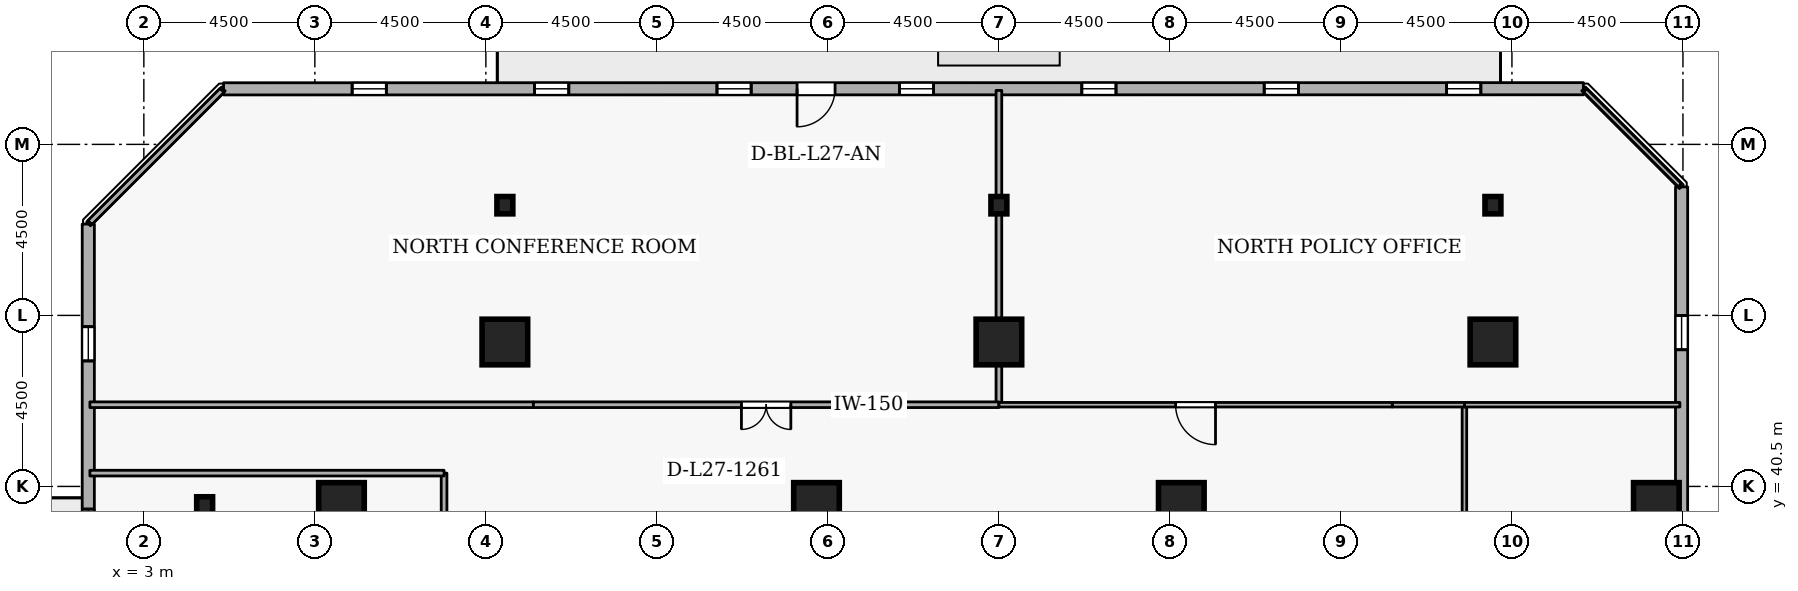
"""IFC4 building model, lengths in metres.
Left out: names, types, materials, properties, quantities, classifications, styles, units other than length and angle.
Written with IfcOpenShell. Run it as: python <this file> out.ifc"""

import sys

from ifc_helpers import new_model, si_unit, direction, frame, frame_2d, origin, origin_2d, place, context, subcontext, project, spatial, rectangle, i_section, extrude, element, fill, save


model = new_model("IFC4")
c1 = context("Model", 3, precision=1e-05, world=origin(), true_north=direction((0.0, 1.0)))
c2 = subcontext(c1, "Body", "Model", "MODEL_VIEW")
j1 = project(units=[si_unit("LENGTHUNIT", "METRE"), si_unit("PLANEANGLEUNIT", "RADIAN")], contexts=[c1])
p1 = place(None, origin())
s1 = spatial("IfcSite", under=j1, at=p1, CompositionType="ELEMENT")
p2 = place(p1, origin())
s2 = spatial("IfcBuilding", under=s1, at=p2, CompositionType="ELEMENT")
p3 = place(p2, frame((0.0, 0.0, 105.3)))
s3 = spatial("IfcBuildingStorey", under=s2, at=p3, CompositionType="ELEMENT", Elevation=105.3)
for number, where, z_axis, x_axis in (
    (1, (42.8, 40.0, 0.0), (0.0, 0.0, 1.0), (1.0, 0.0, 0.0)),
    (2, (12.5, 44.3, 0.0), (0.0, 0.0, 1.0), (1.0, 0.0, 0.0)),
    (3, (25.5, 44.3, 0.0), (0.0, 0.0, 1.0), (1.0, 0.0, 0.0)),
    (4, (38.5, 44.3, 0.0), (0.0, 0.0, 1.0), (1.0, 0.0, 0.0)),
    (5, (8.2, 40.0, 0.0), (0.0, 0.0, 1.0), (1.0, 0.0, 0.0)),
    (6, (20.7, 40.0, 0.0), (0.0, 0.0, 1.0), (1.0, 0.0, 0.0)),
    (7, (30.3, 40.0, 0.0), (0.0, 0.0, 1.0), (1.0, 0.0, 0.0)),
):
    element("IfcColumn", number, at=place(p3, frame(where, z_axis=z_axis, x_axis=x_axis)), inside=s3, PredefinedType="COLUMN", context=c2, shape_type="SweptSolid", body=[
        extrude(rectangle(XDim=1.2, YDim=1.2, at=origin_2d()), origin(), (0.0, 0.0, 1.0), 3.6),
    ])
for number, where, z_axis, x_axis in (
    (8, (12.5, 47.9, 0.0), (0.0, 0.0, 1.0), (1.0, 0.0, 0.0)),
    (9, (25.5, 47.9, 0.0), (0.0, 0.0, 1.0), (1.0, 0.0, 0.0)),
    (10, (38.5, 47.9, 0.0), (0.0, 0.0, 1.0), (1.0, 0.0, 0.0)),
    (11, (4.6, 40.0, 0.0), (0.0, 0.0, 1.0), (1.0, 0.0, 0.0)),
):
    element("IfcColumn", number, at=place(p3, frame(where, z_axis=z_axis, x_axis=x_axis)), inside=s3, PredefinedType="COLUMN", context=c2, shape_type="SweptSolid", body=[
        extrude(i_section(OverallWidth=0.418, OverallDepth=0.456, WebThickness=0.042, FlangeThickness=0.067, FilletRadius=0.015, at=origin_2d()), origin(), (0.0, 0.0, 1.0), 3.6),
    ])
p4 = place(p3, frame((43.461, 12.597, 0.0), z_axis=(0.0, 0.0, 1.0), x_axis=(8.8693006e-05, 0.999999996067, 0.0)))
e12 = element("IfcWall", 12, at=p4, inside=s3, PredefinedType="STANDARD", context=c2, shape_type="SweptSolid", body=[
    extrude(rectangle(XDim=35.784, YDim=0.32, at=frame_2d((17.892, 0.0))), origin(), (0.0, 0.0, 1.0), 2.7),
])
p5 = place(p4, frame((2.7, 0.0, 0.72)))
e13 = element("IfcOpeningElement", 13, at=p5, cuts=e12, PredefinedType="OPENING", context=c2, shape_type="SweptSolid", body=[
    extrude(rectangle(XDim=0.9, YDim=1.75, at=frame_2d((0.45, 0.875))), frame((0.0, 0.17, 0.0), z_axis=(0.0, -1.0, 0.0), x_axis=(1.0, 0.0, 0.0)), (0.0, 0.0, 1.0), 0.34),
])
p6 = place(p4, frame((7.5, 0.0, 0.72)))
e14 = element("IfcOpeningElement", 14, at=p6, cuts=e12, PredefinedType="OPENING", context=c2, shape_type="SweptSolid", body=[
    extrude(rectangle(XDim=0.9, YDim=1.75, at=frame_2d((0.45, 0.875))), frame((0.0, 0.17, 0.0), z_axis=(0.0, -1.0, 0.0), x_axis=(1.0, 0.0, 0.0)), (0.0, 0.0, 1.0), 0.34),
])
p7 = place(p4, frame((12.3, 0.0, 0.72)))
e15 = element("IfcOpeningElement", 15, at=p7, cuts=e12, PredefinedType="OPENING", context=c2, shape_type="SweptSolid", body=[
    extrude(rectangle(XDim=0.9, YDim=1.75, at=frame_2d((0.45, 0.875))), frame((0.0, 0.17, 0.0), z_axis=(0.0, -1.0, 0.0), x_axis=(1.0, 0.0, 0.0)), (0.0, 0.0, 1.0), 0.34),
])
p8 = place(p4, frame((17.1, 0.0, 0.72)))
e16 = element("IfcOpeningElement", 16, at=p8, cuts=e12, PredefinedType="OPENING", context=c2, shape_type="SweptSolid", body=[
    extrude(rectangle(XDim=0.9, YDim=1.75, at=frame_2d((0.45, 0.875))), frame((0.0, 0.17, 0.0), z_axis=(0.0, -1.0, 0.0), x_axis=(1.0, 0.0, 0.0)), (0.0, 0.0, 1.0), 0.34),
])
p9 = place(p4, frame((21.9, 0.0, 0.72)))
e17 = element("IfcOpeningElement", 17, at=p9, cuts=e12, PredefinedType="OPENING", context=c2, shape_type="SweptSolid", body=[
    extrude(rectangle(XDim=0.9, YDim=1.75, at=frame_2d((0.45, 0.875))), frame((0.0, 0.17, 0.0), z_axis=(0.0, -1.0, 0.0), x_axis=(1.0, 0.0, 0.0)), (0.0, 0.0, 1.0), 0.34),
])
p10 = place(p4, frame((31.5, 0.0, 0.72)))
e18 = element("IfcOpeningElement", 18, at=p10, cuts=e12, PredefinedType="OPENING", context=c2, shape_type="SweptSolid", body=[
    extrude(rectangle(XDim=0.9, YDim=1.75, at=frame_2d((0.45, 0.875))), frame((0.0, 0.17, 0.0), z_axis=(0.0, -1.0, 0.0), x_axis=(1.0, 0.0, 0.0)), (0.0, 0.0, 1.0), 0.34),
])
p11 = place(p3, frame((40.881, 50.965, 0.0), z_axis=(0.0, 0.0, 1.0), x_axis=(-0.999999996067, -8.8693006e-05, 0.0)))
e19 = element("IfcWall", 19, at=p11, inside=s3, PredefinedType="STANDARD", context=c2, shape_type="SweptSolid", body=[
    extrude(rectangle(XDim=35.784, YDim=0.32, at=frame_2d((17.892, 0.0))), origin(), (0.0, 0.0, 1.0), 2.7),
])
p12 = place(p11, frame((19.692, 0.0, 0.0)))
e20 = element("IfcOpeningElement", 20, at=p12, cuts=e19, PredefinedType="OPENING", context=c2, shape_type="SweptSolid", body=[
    extrude(rectangle(XDim=1.0, YDim=2.08, at=frame_2d((0.5, 1.04))), frame((0.0, 0.17, 0.0), z_axis=(0.0, -1.0, 0.0), x_axis=(1.0, 0.0, 0.0)), (0.0, 0.0, 1.0), 0.34),
])
p13 = place(p11, frame((2.7, 0.0, 0.72)))
e21 = element("IfcOpeningElement", 21, at=p13, cuts=e19, PredefinedType="OPENING", context=c2, shape_type="SweptSolid", body=[
    extrude(rectangle(XDim=0.9, YDim=1.75, at=frame_2d((0.45, 0.875))), frame((0.0, 0.17, 0.0), z_axis=(0.0, -1.0, 0.0), x_axis=(1.0, 0.0, 0.0)), (0.0, 0.0, 1.0), 0.34),
])
p14 = place(p11, frame((7.5, 0.0, 0.72)))
e22 = element("IfcOpeningElement", 22, at=p14, cuts=e19, PredefinedType="OPENING", context=c2, shape_type="SweptSolid", body=[
    extrude(rectangle(XDim=0.9, YDim=1.75, at=frame_2d((0.45, 0.875))), frame((0.0, 0.17, 0.0), z_axis=(0.0, -1.0, 0.0), x_axis=(1.0, 0.0, 0.0)), (0.0, 0.0, 1.0), 0.34),
])
p15 = place(p11, frame((12.3, 0.0, 0.72)))
e23 = element("IfcOpeningElement", 23, at=p15, cuts=e19, PredefinedType="OPENING", context=c2, shape_type="SweptSolid", body=[
    extrude(rectangle(XDim=0.9, YDim=1.75, at=frame_2d((0.45, 0.875))), frame((0.0, 0.17, 0.0), z_axis=(0.0, -1.0, 0.0), x_axis=(1.0, 0.0, 0.0)), (0.0, 0.0, 1.0), 0.34),
])
p16 = place(p11, frame((17.1, 0.0, 0.72)))
e24 = element("IfcOpeningElement", 24, at=p16, cuts=e19, PredefinedType="OPENING", context=c2, shape_type="SweptSolid", body=[
    extrude(rectangle(XDim=0.9, YDim=1.75, at=frame_2d((0.45, 0.875))), frame((0.0, 0.17, 0.0), z_axis=(0.0, -1.0, 0.0), x_axis=(1.0, 0.0, 0.0)), (0.0, 0.0, 1.0), 0.34),
])
p17 = place(p11, frame((21.9, 0.0, 0.72)))
e25 = element("IfcOpeningElement", 25, at=p17, cuts=e19, PredefinedType="OPENING", context=c2, shape_type="SweptSolid", body=[
    extrude(rectangle(XDim=0.9, YDim=1.75, at=frame_2d((0.45, 0.875))), frame((0.0, 0.17, 0.0), z_axis=(0.0, -1.0, 0.0), x_axis=(1.0, 0.0, 0.0)), (0.0, 0.0, 1.0), 0.34),
])
p18 = place(p11, frame((26.7, 0.0, 0.72)))
e26 = element("IfcOpeningElement", 26, at=p18, cuts=e19, PredefinedType="OPENING", context=c2, shape_type="SweptSolid", body=[
    extrude(rectangle(XDim=0.9, YDim=1.75, at=frame_2d((0.45, 0.875))), frame((0.0, 0.17, 0.0), z_axis=(0.0, -1.0, 0.0), x_axis=(1.0, 0.0, 0.0)), (0.0, 0.0, 1.0), 0.34),
])
p19 = place(p11, frame((31.5, 0.0, 0.72)))
e27 = element("IfcOpeningElement", 27, at=p19, cuts=e19, PredefinedType="OPENING", context=c2, shape_type="SweptSolid", body=[
    extrude(rectangle(XDim=0.9, YDim=1.75, at=frame_2d((0.45, 0.875))), frame((0.0, 0.17, 0.0), z_axis=(0.0, -1.0, 0.0), x_axis=(1.0, 0.0, 0.0)), (0.0, 0.0, 1.0), 0.34),
])
p20 = place(p3, frame((1.539, 47.403, 0.0), z_axis=(0.0, 0.0, 1.0), x_axis=(-8.8693006e-05, -0.999999996067, 0.0)))
e28 = element("IfcWall", 28, at=p20, inside=s3, PredefinedType="STANDARD", context=c2, shape_type="SweptSolid", body=[
    extrude(rectangle(XDim=35.784, YDim=0.32, at=frame_2d((17.892, 0.0))), origin(), (0.0, 0.0, 1.0), 2.7),
])
p21 = place(p20, frame((18.792, 0.0, 0.0)))
e29 = element("IfcOpeningElement", 29, at=p21, cuts=e28, PredefinedType="OPENING", context=c2, shape_type="SweptSolid", body=[
    extrude(rectangle(XDim=1.0, YDim=2.08, at=frame_2d((0.5, 1.04))), frame((0.0, 0.17, 0.0), z_axis=(0.0, -1.0, 0.0), x_axis=(1.0, 0.0, 0.0)), (0.0, 0.0, 1.0), 0.34),
])
p22 = place(p20, frame((2.7, 0.0, 0.72)))
e30 = element("IfcOpeningElement", 30, at=p22, cuts=e28, PredefinedType="OPENING", context=c2, shape_type="SweptSolid", body=[
    extrude(rectangle(XDim=0.9, YDim=1.75, at=frame_2d((0.45, 0.875))), frame((0.0, 0.17, 0.0), z_axis=(0.0, -1.0, 0.0), x_axis=(1.0, 0.0, 0.0)), (0.0, 0.0, 1.0), 0.34),
])
p23 = place(p20, frame((7.5, 0.0, 0.72)))
e31 = element("IfcOpeningElement", 31, at=p23, cuts=e28, PredefinedType="OPENING", context=c2, shape_type="SweptSolid", body=[
    extrude(rectangle(XDim=0.9, YDim=1.75, at=frame_2d((0.45, 0.875))), frame((0.0, 0.17, 0.0), z_axis=(0.0, -1.0, 0.0), x_axis=(1.0, 0.0, 0.0)), (0.0, 0.0, 1.0), 0.34),
])
p24 = place(p20, frame((12.3, 0.0, 0.72)))
e32 = element("IfcOpeningElement", 32, at=p24, cuts=e28, PredefinedType="OPENING", context=c2, shape_type="SweptSolid", body=[
    extrude(rectangle(XDim=0.9, YDim=1.75, at=frame_2d((0.45, 0.875))), frame((0.0, 0.17, 0.0), z_axis=(0.0, -1.0, 0.0), x_axis=(1.0, 0.0, 0.0)), (0.0, 0.0, 1.0), 0.34),
])
p25 = place(p20, frame((17.1, 0.0, 0.72)))
e33 = element("IfcOpeningElement", 33, at=p25, cuts=e28, PredefinedType="OPENING", context=c2, shape_type="SweptSolid", body=[
    extrude(rectangle(XDim=0.9, YDim=1.75, at=frame_2d((0.45, 0.875))), frame((0.0, 0.17, 0.0), z_axis=(0.0, -1.0, 0.0), x_axis=(1.0, 0.0, 0.0)), (0.0, 0.0, 1.0), 0.34),
])
p26 = place(p20, frame((21.9, 0.0, 0.72)))
e34 = element("IfcOpeningElement", 34, at=p26, cuts=e28, PredefinedType="OPENING", context=c2, shape_type="SweptSolid", body=[
    extrude(rectangle(XDim=0.9, YDim=1.75, at=frame_2d((0.45, 0.875))), frame((0.0, 0.17, 0.0), z_axis=(0.0, -1.0, 0.0), x_axis=(1.0, 0.0, 0.0)), (0.0, 0.0, 1.0), 0.34),
])
p27 = place(p20, frame((26.7, 0.0, 0.72)))
e35 = element("IfcOpeningElement", 35, at=p27, cuts=e28, PredefinedType="OPENING", context=c2, shape_type="SweptSolid", body=[
    extrude(rectangle(XDim=0.9, YDim=1.75, at=frame_2d((0.45, 0.875))), frame((0.0, 0.17, 0.0), z_axis=(0.0, -1.0, 0.0), x_axis=(1.0, 0.0, 0.0)), (0.0, 0.0, 1.0), 0.34),
])
p28 = place(p20, frame((31.5, 0.0, 0.72)))
e36 = element("IfcOpeningElement", 36, at=p28, cuts=e28, PredefinedType="OPENING", context=c2, shape_type="SweptSolid", body=[
    extrude(rectangle(XDim=0.9, YDim=1.75, at=frame_2d((0.45, 0.875))), frame((0.0, 0.17, 0.0), z_axis=(0.0, -1.0, 0.0), x_axis=(1.0, 0.0, 0.0)), (0.0, 0.0, 1.0), 0.34),
])
p29 = place(p3, frame((10.9, 40.85, 0.0), z_axis=(0.0, 0.0, 1.0), x_axis=(0.0, -1.0, 0.0)))
e37 = element("IfcWall", 37, at=p29, inside=s3, PredefinedType="PARTITIONING", context=c2, shape_type="SweptSolid", body=[
    extrude(rectangle(XDim=4.912, YDim=0.15, at=frame_2d((2.456, 0.0))), origin(), (0.0, 0.0, 1.0), 3.34),
])
p30 = place(p3, frame((1.58, 40.85, 0.0), z_axis=(0.0, 0.0, 1.0), x_axis=(1.0, 0.0, 0.0)))
e38 = element("IfcWall", 38, at=p30, inside=s3, PredefinedType="PARTITIONING", context=c2, shape_type="SweptSolid", body=[
    extrude(rectangle(XDim=9.32, YDim=0.15, at=frame_2d((4.66, 0.0))), origin(), (0.0, 0.0, 1.0), 3.34),
])
p31 = place(p3, frame((37.75, 33.3, 0.0), z_axis=(0.0, 0.0, 1.0), x_axis=(0.0, 1.0, 0.0)))
e39 = element("IfcWall", 39, at=p31, inside=s3, PredefinedType="PARTITIONING", context=c2, shape_type="SweptSolid", body=[
    extrude(rectangle(XDim=9.35, YDim=0.12, at=frame_2d((4.675, 0.0))), origin(), (0.0, 0.0, 1.0), 3.34),
])
p32 = place(p31, frame((4.15, 0.0, 0.0)))
e40 = element("IfcOpeningElement", 40, at=p32, cuts=e39, PredefinedType="OPENING", context=c2, shape_type="SweptSolid", body=[
    extrude(rectangle(XDim=1.05, YDim=2.1, at=frame_2d((0.525, 1.05))), frame((0.0, 0.07, 0.0), z_axis=(0.0, -1.0, 0.0), x_axis=(1.0, 0.0, 0.0)), (0.0, 0.0, 1.0), 0.14),
])
p33 = place(p3, frame((37.75, 42.65, 0.0), z_axis=(0.0, 0.0, 1.0), x_axis=(1.0, 0.0, 0.0)))
e41 = element("IfcWall", 41, at=p33, inside=s3, PredefinedType="PARTITIONING", context=c2, shape_type="SweptSolid", body=[
    extrude(rectangle(XDim=5.67, YDim=0.12, at=frame_2d((2.835, 0.0))), origin(), (0.0, 0.0, 1.0), 3.34),
])
p34 = place(p3, frame((13.25, 42.65, 0.0), z_axis=(0.0, 0.0, 1.0), x_axis=(-1.0, 0.0, 0.0)))
e42 = element("IfcWall", 42, at=p34, inside=s3, PredefinedType="PARTITIONING", context=c2, shape_type="SweptSolid", body=[
    extrude(rectangle(XDim=11.67, YDim=0.15, at=frame_2d((5.835, 0.0))), origin(), (0.0, 0.0, 1.0), 3.34),
])
p35 = place(p3, frame((1.58, 47.443, 0.0), z_axis=(0.0, 0.0, 1.0), x_axis=(0.707106781187, 0.707106781187, 0.0)))
e43 = element("IfcWall", 43, at=p35, inside=s3, PredefinedType="PARTITIONING", context=c2, shape_type="SweptSolid", body=[
    extrude(rectangle(XDim=4.917, YDim=0.15, at=frame_2d((2.458, 0.0))), origin(), (0.0, 0.0, 1.0), 3.34),
])
p36 = place(p3, frame((25.5, 50.92, 0.0), z_axis=(0.0, 0.0, 1.0), x_axis=(0.0, -1.0, 0.0)))
e44 = element("IfcWall", 44, at=p36, inside=s3, PredefinedType="PARTITIONING", context=c2, shape_type="SweptSolid", body=[
    extrude(rectangle(XDim=8.27, YDim=0.15, at=frame_2d((4.135, 0.0))), origin(), (0.0, 0.0, 1.0), 2.878),
])
p37 = place(p3, frame((25.5, 42.65, 0.0), z_axis=(0.0, 0.0, 1.0), x_axis=(-1.0, 0.0, 0.0)))
e45 = element("IfcWall", 45, at=p37, inside=s3, PredefinedType="PARTITIONING", context=c2, shape_type="SweptSolid", body=[
    extrude(rectangle(XDim=12.25, YDim=0.15, at=frame_2d((6.125, 0.0))), origin(), (0.0, 0.0, 1.0), 3.34),
])
p38 = place(p37, frame((5.475, 0.0, 0.0)))
e46 = element("IfcOpeningElement", 46, at=p38, cuts=e45, PredefinedType="OPENING", context=c2, shape_type="SweptSolid", body=[
    extrude(rectangle(XDim=1.3, YDim=2.12, at=frame_2d((0.65, 1.06))), frame((0.0, 0.085, 0.0), z_axis=(0.0, -1.0, 0.0), x_axis=(1.0, 0.0, 0.0)), (0.0, 0.0, 1.0), 0.17),
])
p39 = place(p3, frame((37.75, 42.65, 0.0), z_axis=(0.0, 0.0, 1.0), x_axis=(-1.0, 0.0, 0.0)))
e47 = element("IfcWall", 47, at=p39, inside=s3, PredefinedType="PARTITIONING", context=c2, shape_type="SweptSolid", body=[
    extrude(rectangle(XDim=1.9, YDim=0.12, at=frame_2d((0.95, 0.0))), origin(), (0.0, 0.0, 1.0), 3.34),
])
p40 = place(p3, frame((35.85, 42.65, 0.0), z_axis=(0.0, 0.0, 1.0), x_axis=(-1.0, 0.0, 0.0)))
e48 = element("IfcWall", 48, at=p40, inside=s3, PredefinedType="PARTITIONING", context=c2, shape_type="SweptSolid", body=[
    extrude(rectangle(XDim=10.35, YDim=0.12, at=frame_2d((5.175, 0.0))), origin(), (0.0, 0.0, 1.0), 2.895),
])
p41 = place(p40, frame((4.65, 0.0, 0.0)))
e49 = element("IfcOpeningElement", 49, at=p41, cuts=e48, PredefinedType="OPENING", context=c2, shape_type="SweptSolid", body=[
    extrude(rectangle(XDim=1.05, YDim=2.1, at=frame_2d((0.525, 1.05))), frame((0.0, 0.07, 0.0), z_axis=(0.0, -1.0, 0.0), x_axis=(1.0, 0.0, 0.0)), (0.0, 0.0, 1.0), 0.14),
])
p42 = place(p3, frame((40.925, 50.92, 0.0), z_axis=(0.0, 0.0, 1.0), x_axis=(0.707106781187, -0.707106781187, 0.0)))
e50 = element("IfcWall", 50, at=p42, inside=s3, PredefinedType="PARTITIONING", context=c2, shape_type="SweptSolid", body=[
    extrude(rectangle(XDim=3.528, YDim=0.12, at=frame_2d((1.764, 0.0))), origin(), (0.0, 0.0, 1.0), 3.34),
])
p43 = place(p10, origin())
e51 = element("IfcWindow", 51, at=p43, inside=s3, PartitioningType="SINGLE_PANEL", PredefinedType="WINDOW", context=c2, shape_type="SweptSolid", body=[
    extrude(rectangle(XDim=0.9, YDim=1.75, at=frame_2d((0.45, 0.875))), frame((0.0, 0.03, 0.0), z_axis=(0.0, -1.0, 0.0), x_axis=(1.0, 0.0, 0.0)), (0.0, 0.0, 1.0), 0.06),
])
fill(e18, e51)
p44 = place(p12, origin())
e52 = element("IfcDoor", 52, at=p44, inside=s3, OperationType="SINGLE_SWING_RIGHT", PredefinedType="DOOR", context=c2, shape_type="SweptSolid", body=[
    extrude(rectangle(XDim=1.0, YDim=2.08, at=frame_2d((0.5, 1.04))), frame((0.0, 0.025, 0.0), z_axis=(0.0, -1.0, 0.0), x_axis=(1.0, 0.0, 0.0)), (0.0, 0.0, 1.0), 0.05),
])
fill(e20, e52)
p45 = place(p13, origin())
e53 = element("IfcWindow", 53, at=p45, inside=s3, PartitioningType="SINGLE_PANEL", PredefinedType="WINDOW", context=c2, shape_type="SweptSolid", body=[
    extrude(rectangle(XDim=0.9, YDim=1.75, at=frame_2d((0.45, 0.875))), frame((0.0, 0.03, 0.0), z_axis=(0.0, -1.0, 0.0), x_axis=(1.0, 0.0, 0.0)), (0.0, 0.0, 1.0), 0.06),
])
fill(e21, e53)
p46 = place(p14, origin())
e54 = element("IfcWindow", 54, at=p46, inside=s3, PartitioningType="SINGLE_PANEL", PredefinedType="WINDOW", context=c2, shape_type="SweptSolid", body=[
    extrude(rectangle(XDim=0.9, YDim=1.75, at=frame_2d((0.45, 0.875))), frame((0.0, 0.03, 0.0), z_axis=(0.0, -1.0, 0.0), x_axis=(1.0, 0.0, 0.0)), (0.0, 0.0, 1.0), 0.06),
])
fill(e22, e54)
p47 = place(p15, origin())
e55 = element("IfcWindow", 55, at=p47, inside=s3, PartitioningType="SINGLE_PANEL", PredefinedType="WINDOW", context=c2, shape_type="SweptSolid", body=[
    extrude(rectangle(XDim=0.9, YDim=1.75, at=frame_2d((0.45, 0.875))), frame((0.0, 0.03, 0.0), z_axis=(0.0, -1.0, 0.0), x_axis=(1.0, 0.0, 0.0)), (0.0, 0.0, 1.0), 0.06),
])
fill(e23, e55)
p48 = place(p16, origin())
e56 = element("IfcWindow", 56, at=p48, inside=s3, PartitioningType="SINGLE_PANEL", PredefinedType="WINDOW", context=c2, shape_type="SweptSolid", body=[
    extrude(rectangle(XDim=0.9, YDim=1.75, at=frame_2d((0.45, 0.875))), frame((0.0, 0.03, 0.0), z_axis=(0.0, -1.0, 0.0), x_axis=(1.0, 0.0, 0.0)), (0.0, 0.0, 1.0), 0.06),
])
fill(e24, e56)
p49 = place(p17, origin())
e57 = element("IfcWindow", 57, at=p49, inside=s3, PartitioningType="SINGLE_PANEL", PredefinedType="WINDOW", context=c2, shape_type="SweptSolid", body=[
    extrude(rectangle(XDim=0.9, YDim=1.75, at=frame_2d((0.45, 0.875))), frame((0.0, 0.03, 0.0), z_axis=(0.0, -1.0, 0.0), x_axis=(1.0, 0.0, 0.0)), (0.0, 0.0, 1.0), 0.06),
])
fill(e25, e57)
p50 = place(p18, origin())
e58 = element("IfcWindow", 58, at=p50, inside=s3, PartitioningType="SINGLE_PANEL", PredefinedType="WINDOW", context=c2, shape_type="SweptSolid", body=[
    extrude(rectangle(XDim=0.9, YDim=1.75, at=frame_2d((0.45, 0.875))), frame((0.0, 0.03, 0.0), z_axis=(0.0, -1.0, 0.0), x_axis=(1.0, 0.0, 0.0)), (0.0, 0.0, 1.0), 0.06),
])
fill(e26, e58)
p51 = place(p19, origin())
e59 = element("IfcWindow", 59, at=p51, inside=s3, PartitioningType="SINGLE_PANEL", PredefinedType="WINDOW", context=c2, shape_type="SweptSolid", body=[
    extrude(rectangle(XDim=0.9, YDim=1.75, at=frame_2d((0.45, 0.875))), frame((0.0, 0.03, 0.0), z_axis=(0.0, -1.0, 0.0), x_axis=(1.0, 0.0, 0.0)), (0.0, 0.0, 1.0), 0.06),
])
fill(e27, e59)
p52 = place(p22, origin())
e60 = element("IfcWindow", 60, at=p52, inside=s3, PartitioningType="SINGLE_PANEL", PredefinedType="WINDOW", context=c2, shape_type="SweptSolid", body=[
    extrude(rectangle(XDim=0.9, YDim=1.75, at=frame_2d((0.45, 0.875))), frame((0.0, 0.03, 0.0), z_axis=(0.0, -1.0, 0.0), x_axis=(1.0, 0.0, 0.0)), (0.0, 0.0, 1.0), 0.06),
])
fill(e30, e60)
p53 = place(p23, origin())
e61 = element("IfcWindow", 61, at=p53, inside=s3, PartitioningType="SINGLE_PANEL", PredefinedType="WINDOW", context=c2, shape_type="SweptSolid", body=[
    extrude(rectangle(XDim=0.9, YDim=1.75, at=frame_2d((0.45, 0.875))), frame((0.0, 0.03, 0.0), z_axis=(0.0, -1.0, 0.0), x_axis=(1.0, 0.0, 0.0)), (0.0, 0.0, 1.0), 0.06),
])
fill(e31, e61)
p54 = place(p38, origin())
e62 = element("IfcDoor", 62, at=p54, inside=s3, OperationType="DOUBLE_DOOR_SINGLE_SWING", PredefinedType="DOOR", context=c2, shape_type="SweptSolid", body=[
    extrude(rectangle(XDim=1.3, YDim=2.12, at=frame_2d((0.65, 1.06))), frame((0.0, 0.025, 0.0), z_axis=(0.0, -1.0, 0.0), x_axis=(1.0, 0.0, 0.0)), (0.0, 0.0, 1.0), 0.05),
])
fill(e46, e62)
p55 = place(p41, origin())
e63 = element("IfcDoor", 63, at=p55, inside=s3, OperationType="SINGLE_SWING_LEFT", PredefinedType="DOOR", context=c2, shape_type="SweptSolid", body=[
    extrude(rectangle(XDim=1.05, YDim=2.1, at=frame_2d((0.525, 1.05))), frame((0.0, 0.025, 0.0), z_axis=(0.0, -1.0, 0.0), x_axis=(1.0, 0.0, 0.0)), (0.0, 0.0, 1.0), 0.05),
])
fill(e49, e63)
save(model, sys.argv[1])
